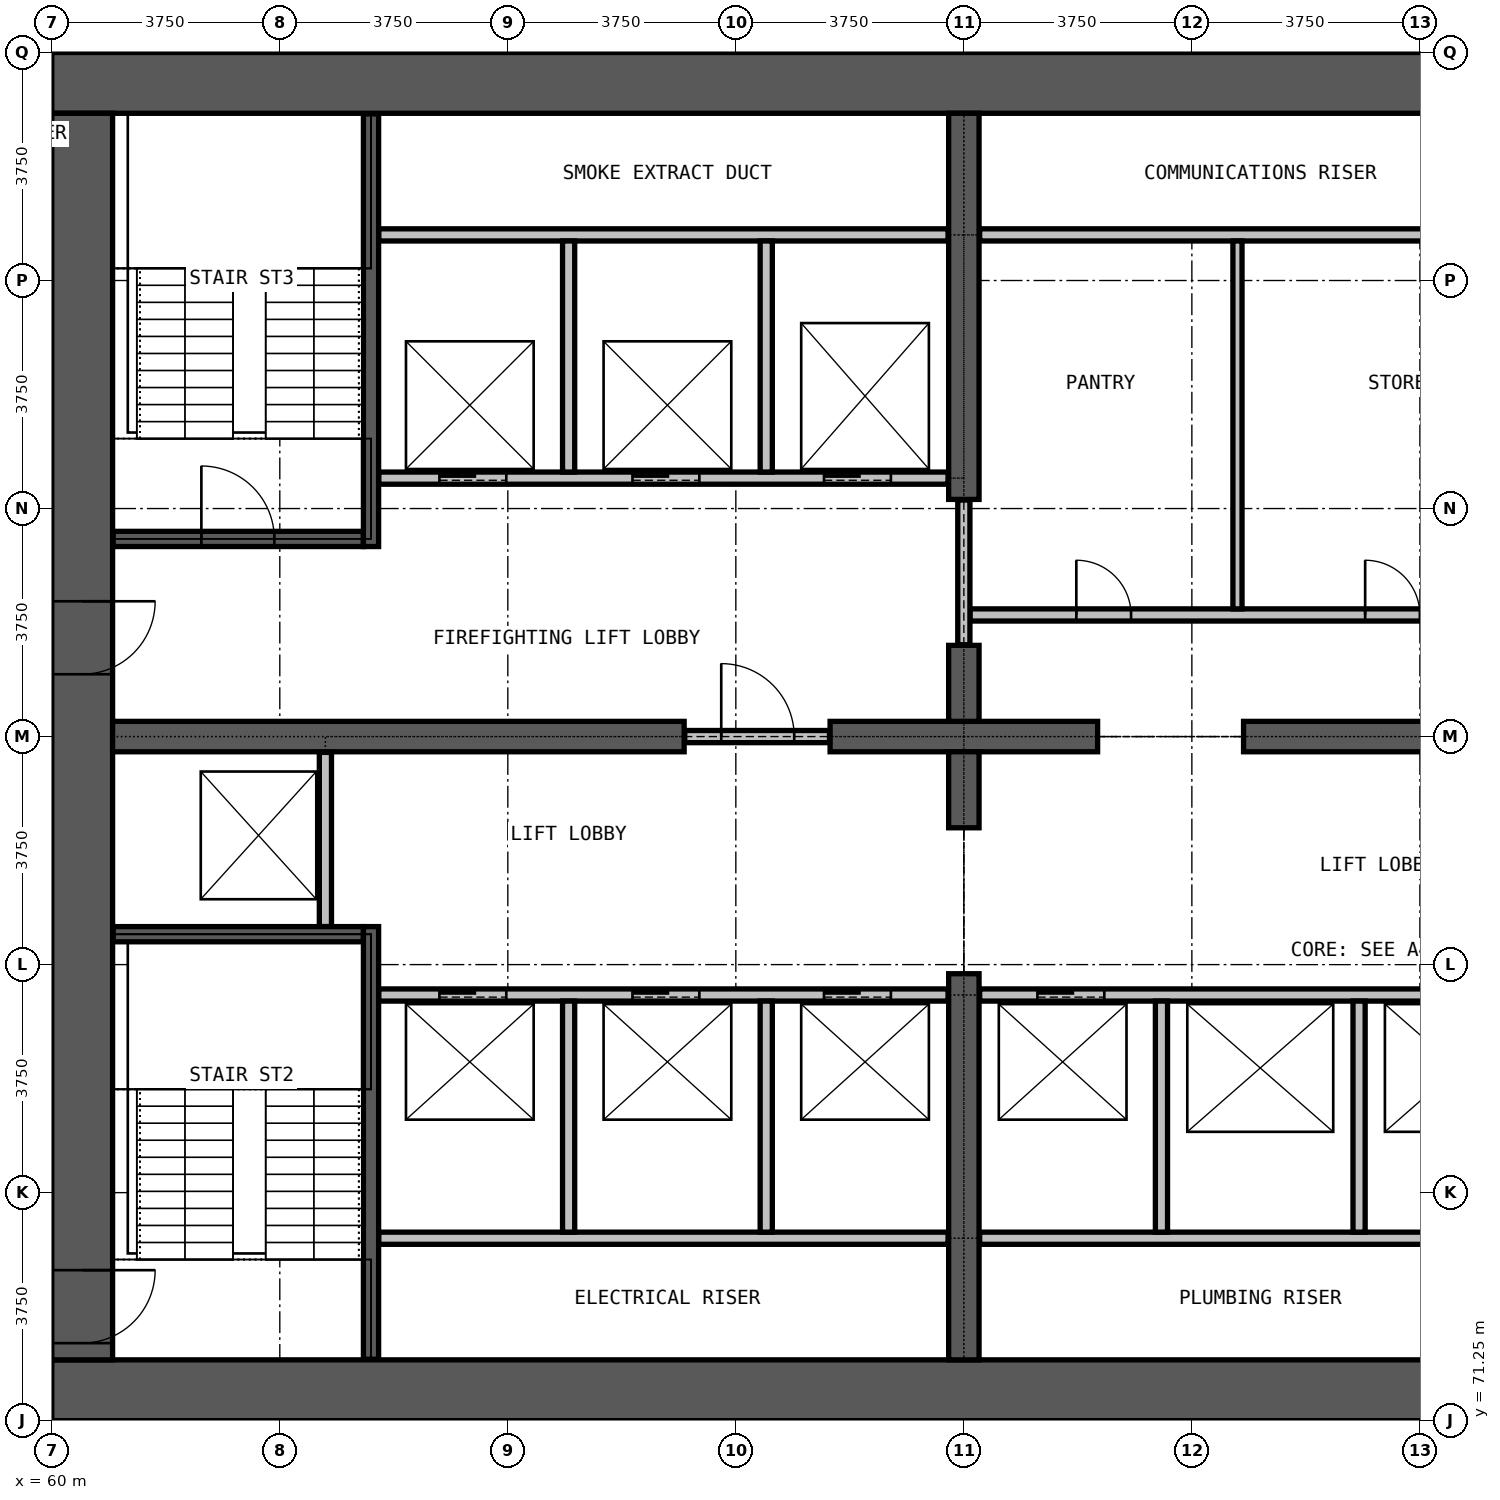
"""IFC4 building model, lengths in metres.
Left out: names, types, materials, properties, quantities, classifications, styles, units other than length and angle.
Written with IfcOpenShell. Run it as: python <this file> out.ifc"""

import sys

from ifc_helpers import new_model, si_unit, direction, frame, frame_2d, origin, place, context, subcontext, project, spatial, rectangle, extrude, element, fill, save


model = new_model("IFC4")
c1 = context("Model", 3, precision=1e-05, world=origin(), true_north=direction((0.0, 1.0)))
c2 = subcontext(c1, "Body", "Model", "MODEL_VIEW")
j1 = project(units=[si_unit("LENGTHUNIT", "METRE"), si_unit("PLANEANGLEUNIT", "RADIAN")], contexts=[c1])
p1 = place(None, origin())
s1 = spatial("IfcSite", under=j1, at=p1, CompositionType="ELEMENT")
p2 = place(p1, origin())
s2 = spatial("IfcBuilding", under=s1, at=p2, CompositionType="ELEMENT")
p3 = place(p2, frame((0.0, 0.0, 16.5)))
s3 = spatial("IfcBuildingStorey", under=s2, at=p3, CompositionType="ELEMENT", Elevation=16.5)
for number, where, z_axis, x_axis in (
    (1, (60.0, 71.75, 0.0), (0.0, 0.0, 1.0), (1.0, 0.0, 0.0)),
    (2, (90.0, 93.25, 0.0), (0.0, 0.0, 1.0), (-1.0, 0.0, 0.0)),
):
    element("IfcWall", number, at=place(p3, frame(where, z_axis=z_axis, x_axis=x_axis)), inside=s3, PredefinedType="SHEAR", context=c2, shape_type="SweptSolid", body=[
        extrude(rectangle(XDim=30.0, YDim=1.0, at=frame_2d((15.0, 0.0))), origin(), (0.0, 0.0, 1.0), 7.5),
    ])
p4 = place(p3, frame((60.5, 92.75, 0.0), z_axis=(0.0, 0.0, 1.0), x_axis=(0.0, -1.0, 0.0)))
e3 = element("IfcWall", 3, at=p4, inside=s3, PredefinedType="SHEAR", context=c2, shape_type="SweptSolid", body=[
    extrude(rectangle(XDim=20.5, YDim=1.0, at=frame_2d((10.25, 0.0))), origin(), (0.0, 0.0, 1.0), 7.5),
])
p5 = place(p4, frame((19.025, 0.0, 0.0)))
e4 = element("IfcOpeningElement", 4, at=p5, cuts=e3, PredefinedType="OPENING", context=c2, shape_type="SweptSolid", body=[
    extrude(rectangle(XDim=1.2, YDim=2.2, at=frame_2d((0.6, 1.1))), frame((0.0, 0.51, 0.0), z_axis=(0.0, -1.0, 0.0), x_axis=(1.0, 0.0, 0.0)), (0.0, 0.0, 1.0), 1.02),
])
p6 = place(p4, frame((8.025, 0.0, 0.0)))
e5 = element("IfcOpeningElement", 5, at=p6, cuts=e3, PredefinedType="OPENING", context=c2, shape_type="SweptSolid", body=[
    extrude(rectangle(XDim=1.2, YDim=2.2, at=frame_2d((0.6, 1.1))), frame((0.0, 0.51, 0.0), z_axis=(0.0, -1.0, 0.0), x_axis=(1.0, 0.0, 0.0)), (0.0, 0.0, 1.0), 1.02),
])
p7 = place(p3, frame((61.0, 82.5, 0.0), z_axis=(0.0, 0.0, 1.0), x_axis=(1.0, 0.0, 0.0)))
e6 = element("IfcWall", 6, at=p7, inside=s3, PredefinedType="SHEAR", context=c2, shape_type="SweptSolid", body=[
    extrude(rectangle(XDim=9.4, YDim=0.5, at=frame_2d((4.7, 0.0))), origin(), (0.0, 0.0, 1.0), 7.5),
])
p8 = place(p3, frame((72.8, 82.5, 0.0), z_axis=(0.0, 0.0, 1.0), x_axis=(1.0, 0.0, 0.0)))
e7 = element("IfcWall", 7, at=p8, inside=s3, PredefinedType="SHEAR", context=c2, shape_type="SweptSolid", body=[
    extrude(rectangle(XDim=4.4, YDim=0.5, at=frame_2d((2.2, 0.0))), origin(), (0.0, 0.0, 1.0), 7.5),
])
p9 = place(p3, frame((79.6, 82.5, 0.0), z_axis=(0.0, 0.0, 1.0), x_axis=(1.0, 0.0, 0.0)))
e8 = element("IfcWall", 8, at=p9, inside=s3, PredefinedType="SHEAR", context=c2, shape_type="SweptSolid", body=[
    extrude(rectangle(XDim=9.4, YDim=0.5, at=frame_2d((4.7, 0.0))), origin(), (0.0, 0.0, 1.0), 7.5),
])
p10 = place(p3, frame((75.0, 72.25, 0.0), z_axis=(0.0, 0.0, 1.0), x_axis=(0.0, 1.0, 0.0)))
e9 = element("IfcWall", 9, at=p10, inside=s3, PredefinedType="SHEAR", context=c2, shape_type="SweptSolid", body=[
    extrude(rectangle(XDim=6.35, YDim=0.5, at=frame_2d((3.175, 0.0))), origin(), (0.0, 0.0, 1.0), 7.5),
])
for number, where, z_axis, x_axis in (
    (10, (75.0, 81.0, 0.0), (0.0, 0.0, 1.0), (0.0, 1.0, 0.0)),
    (11, (75.0, 82.75, 0.0), (0.0, 0.0, 1.0), (0.0, 1.0, 0.0)),
):
    element("IfcWall", number, at=place(p3, frame(where, z_axis=z_axis, x_axis=x_axis)), inside=s3, PredefinedType="SHEAR", context=c2, shape_type="SweptSolid", body=[
        extrude(rectangle(XDim=1.25, YDim=0.5, at=frame_2d((0.625, 0.0))), origin(), (0.0, 0.0, 1.0), 7.5),
    ])
p11 = place(p3, frame((75.0, 86.4, 0.0), z_axis=(0.0, 0.0, 1.0), x_axis=(0.0, 1.0, 0.0)))
e12 = element("IfcWall", 12, at=p11, inside=s3, PredefinedType="SHEAR", context=c2, shape_type="SweptSolid", body=[
    extrude(rectangle(XDim=6.35, YDim=0.5, at=frame_2d((3.175, 0.0))), origin(), (0.0, 0.0, 1.0), 7.5),
])
p12 = place(p3, frame((70.41, 82.5, 0.0), z_axis=(0.0, 0.0, 1.0), x_axis=(1.0, 0.0, 0.0)))
e13 = element("IfcWall", 13, at=p12, inside=s3, PredefinedType="PARTITIONING", context=c2, shape_type="SweptSolid", body=[
    extrude(rectangle(XDim=2.38, YDim=0.2, at=frame_2d((1.19, 0.0))), origin(), (0.0, 0.0, 1.0), 2.4),
])
p13 = place(p12, frame((0.6, 0.0, 0.0)))
e14 = element("IfcOpeningElement", 14, at=p13, cuts=e13, PredefinedType="OPENING", context=c2, shape_type="SweptSolid", body=[
    extrude(rectangle(XDim=1.2, YDim=2.2, at=frame_2d((0.6, 1.1))), frame((0.0, 0.11, 0.0), z_axis=(0.0, -1.0, 0.0), x_axis=(1.0, 0.0, 0.0)), (0.0, 0.0, 1.0), 0.22),
])
p14 = place(p3, frame((75.1, 84.5, 0.0), z_axis=(0.0, 0.0, 1.0), x_axis=(1.0, 0.0, 0.0)))
e15 = element("IfcWall", 15, at=p14, inside=s3, PredefinedType="PARTITIONING", context=c2, shape_type="SweptSolid", body=[
    extrude(rectangle(XDim=9.55, YDim=0.2, at=frame_2d((4.775, 0.0))), origin(), (0.0, 0.0, 1.0), 7.15),
])
p15 = place(p14, frame((1.75, 0.0, 0.0)))
e16 = element("IfcOpeningElement", 16, at=p15, cuts=e15, PredefinedType="OPENING", context=c2, shape_type="SweptSolid", body=[
    extrude(rectangle(XDim=0.9, YDim=2.2, at=frame_2d((0.45, 1.1))), frame((0.0, 0.11, 0.0), z_axis=(0.0, -1.0, 0.0), x_axis=(1.0, 0.0, 0.0)), (0.0, 0.0, 1.0), 0.22),
])
p16 = place(p14, frame((6.5, 0.0, 0.0)))
e17 = element("IfcOpeningElement", 17, at=p16, cuts=e15, PredefinedType="OPENING", context=c2, shape_type="SweptSolid", body=[
    extrude(rectangle(XDim=0.9, YDim=2.2, at=frame_2d((0.45, 1.1))), frame((0.0, 0.11, 0.0), z_axis=(0.0, -1.0, 0.0), x_axis=(1.0, 0.0, 0.0)), (0.0, 0.0, 1.0), 0.22),
])
p17 = place(p3, frame((75.26, 90.75, 0.0), z_axis=(0.0, 0.0, 1.0), x_axis=(1.0, 0.0, 0.0)))
e18 = element("IfcWall", 18, at=p17, inside=s3, PredefinedType="PARTITIONING", context=c2, shape_type="SweptSolid", body=[
    extrude(rectangle(XDim=9.365, YDim=0.2, at=frame_2d((4.683, 0.0))), origin(), (0.0, 0.0, 1.0), 7.15),
])
p18 = place(p3, frame((75.0, 84.01, 0.0), z_axis=(0.0, 0.0, 1.0), x_axis=(0.0, 1.0, 0.0)))
e19 = element("IfcWall", 19, at=p18, inside=s3, PredefinedType="PARTITIONING", context=c2, shape_type="SweptSolid", body=[
    extrude(rectangle(XDim=2.38, YDim=0.2, at=frame_2d((1.19, 0.0))), origin(), (0.0, 0.0, 1.0), 2.4),
])
p19 = place(p3, frame((79.5, 84.6, 0.0), z_axis=(0.0, 0.0, 1.0), x_axis=(0.0, 1.0, 0.0)))
e20 = element("IfcWall", 20, at=p19, inside=s3, PredefinedType="PARTITIONING", context=c2, shape_type="SweptSolid", body=[
    extrude(rectangle(XDim=6.05, YDim=0.15, at=frame_2d((3.025, 0.0))), origin(), (0.0, 0.0, 1.0), 7.15),
])
for number, where, z_axis, x_axis in (
    (21, (65.375, 74.25, 0.0), (0.0, 0.0, 1.0), (1.0, 0.0, 0.0)),
    (22, (75.26, 74.25, 0.0), (0.0, 0.0, 1.0), (1.0, 0.0, 0.0)),
):
    element("IfcWall", number, at=place(p3, frame(where, z_axis=z_axis, x_axis=x_axis)), inside=s3, PredefinedType="PARTITIONING", context=c2, shape_type="SweptSolid", body=[
        extrude(rectangle(XDim=9.365, YDim=0.2, at=frame_2d((4.683, 0.0))), origin(), (0.0, 0.0, 1.0), 7.15),
    ])
p20 = place(p3, frame((65.375, 78.25, 0.0), z_axis=(0.0, 0.0, 1.0), x_axis=(1.0, 0.0, 0.0)))
e23 = element("IfcWall", 23, at=p20, inside=s3, PredefinedType="PARTITIONING", context=c2, shape_type="SweptSolid", body=[
    extrude(rectangle(XDim=9.365, YDim=0.2, at=frame_2d((4.683, 0.0))), origin(), (0.0, 0.0, 1.0), 7.15),
])
p21 = place(p20, frame((1.0, 0.0, 0.0)))
e24 = element("IfcOpeningElement", 24, at=p21, cuts=e23, PredefinedType="OPENING", context=c2, shape_type="SweptSolid", body=[
    extrude(rectangle(XDim=1.1, YDim=2.2, at=frame_2d((0.55, 1.1))), frame((0.0, 0.11, 0.0), z_axis=(0.0, -1.0, 0.0), x_axis=(1.0, 0.0, 0.0)), (0.0, 0.0, 1.0), 0.22),
])
p22 = place(p20, frame((4.175, 0.0, 0.0)))
e25 = element("IfcOpeningElement", 25, at=p22, cuts=e23, PredefinedType="OPENING", context=c2, shape_type="SweptSolid", body=[
    extrude(rectangle(XDim=1.1, YDim=2.2, at=frame_2d((0.55, 1.1))), frame((0.0, 0.11, 0.0), z_axis=(0.0, -1.0, 0.0), x_axis=(1.0, 0.0, 0.0)), (0.0, 0.0, 1.0), 0.22),
])
p23 = place(p20, frame((7.325, 0.0, 0.0)))
e26 = element("IfcOpeningElement", 26, at=p23, cuts=e23, PredefinedType="OPENING", context=c2, shape_type="SweptSolid", body=[
    extrude(rectangle(XDim=1.1, YDim=2.2, at=frame_2d((0.55, 1.1))), frame((0.0, 0.11, 0.0), z_axis=(0.0, -1.0, 0.0), x_axis=(1.0, 0.0, 0.0)), (0.0, 0.0, 1.0), 0.22),
])
p24 = place(p3, frame((75.26, 78.25, 0.0), z_axis=(0.0, 0.0, 1.0), x_axis=(1.0, 0.0, 0.0)))
e27 = element("IfcWall", 27, at=p24, inside=s3, PredefinedType="PARTITIONING", context=c2, shape_type="SweptSolid", body=[
    extrude(rectangle(XDim=9.365, YDim=0.2, at=frame_2d((4.683, 0.0))), origin(), (0.0, 0.0, 1.0), 7.15),
])
p25 = place(p24, frame((0.95, 0.0, 0.0)))
e28 = element("IfcOpeningElement", 28, at=p25, cuts=e27, PredefinedType="OPENING", context=c2, shape_type="SweptSolid", body=[
    extrude(rectangle(XDim=1.1, YDim=2.2, at=frame_2d((0.55, 1.1))), frame((0.0, 0.11, 0.0), z_axis=(0.0, -1.0, 0.0), x_axis=(1.0, 0.0, 0.0)), (0.0, 0.0, 1.0), 0.22),
])
p26 = place(p3, frame((65.375, 86.75, 0.0), z_axis=(0.0, 0.0, 1.0), x_axis=(1.0, 0.0, 0.0)))
e29 = element("IfcWall", 29, at=p26, inside=s3, PredefinedType="PARTITIONING", context=c2, shape_type="SweptSolid", body=[
    extrude(rectangle(XDim=9.365, YDim=0.2, at=frame_2d((4.683, 0.0))), origin(), (0.0, 0.0, 1.0), 7.15),
])
p27 = place(p26, frame((1.0, 0.0, 0.0)))
e30 = element("IfcOpeningElement", 30, at=p27, cuts=e29, PredefinedType="OPENING", context=c2, shape_type="SweptSolid", body=[
    extrude(rectangle(XDim=1.1, YDim=2.2, at=frame_2d((0.55, 1.1))), frame((0.0, 0.11, 0.0), z_axis=(0.0, -1.0, 0.0), x_axis=(1.0, 0.0, 0.0)), (0.0, 0.0, 1.0), 0.22),
])
p28 = place(p26, frame((4.175, 0.0, 0.0)))
e31 = element("IfcOpeningElement", 31, at=p28, cuts=e29, PredefinedType="OPENING", context=c2, shape_type="SweptSolid", body=[
    extrude(rectangle(XDim=1.1, YDim=2.2, at=frame_2d((0.55, 1.1))), frame((0.0, 0.11, 0.0), z_axis=(0.0, -1.0, 0.0), x_axis=(1.0, 0.0, 0.0)), (0.0, 0.0, 1.0), 0.22),
])
p29 = place(p26, frame((7.325, 0.0, 0.0)))
e32 = element("IfcOpeningElement", 32, at=p29, cuts=e29, PredefinedType="OPENING", context=c2, shape_type="SweptSolid", body=[
    extrude(rectangle(XDim=1.1, YDim=2.2, at=frame_2d((0.55, 1.1))), frame((0.0, 0.11, 0.0), z_axis=(0.0, -1.0, 0.0), x_axis=(1.0, 0.0, 0.0)), (0.0, 0.0, 1.0), 0.22),
])
p30 = place(p3, frame((65.375, 90.75, 0.0), z_axis=(0.0, 0.0, 1.0), x_axis=(1.0, 0.0, 0.0)))
e33 = element("IfcWall", 33, at=p30, inside=s3, PredefinedType="PARTITIONING", context=c2, shape_type="SweptSolid", body=[
    extrude(rectangle(XDim=9.365, YDim=0.2, at=frame_2d((4.683, 0.0))), origin(), (0.0, 0.0, 1.0), 7.15),
])
p31 = place(p3, frame((64.5, 79.375, 0.0), z_axis=(0.0, 0.0, 1.0), x_axis=(0.0, 1.0, 0.0)))
e34 = element("IfcWall", 34, at=p31, inside=s3, PredefinedType="PARTITIONING", context=c2, shape_type="SweptSolid", body=[
    extrude(rectangle(XDim=2.865, YDim=0.2, at=frame_2d((1.433, 0.0))), origin(), (0.0, 0.0, 1.0), 7.15),
])
for number, where, z_axis, x_axis in (
    (35, (68.5, 74.35, 0.0), (0.0, 0.0, 1.0), (0.0, 1.0, 0.0)),
    (36, (68.5, 86.85, 0.0), (0.0, 0.0, 1.0), (0.0, 1.0, 0.0)),
    (37, (71.75, 74.35, 0.0), (0.0, 0.0, 1.0), (0.0, 1.0, 0.0)),
    (38, (71.75, 86.85, 0.0), (0.0, 0.0, 1.0), (0.0, 1.0, 0.0)),
    (39, (78.25, 74.35, 0.0), (0.0, 0.0, 1.0), (0.0, 1.0, 0.0)),
    (40, (81.5, 74.35, 0.0), (0.0, 0.0, 1.0), (0.0, 1.0, 0.0)),
):
    element("IfcWall", number, at=place(p3, frame(where, z_axis=z_axis, x_axis=x_axis)), inside=s3, PredefinedType="PARTITIONING", context=c2, shape_type="SweptSolid", body=[
        extrude(rectangle(XDim=3.8, YDim=0.2, at=frame_2d((1.9, 0.0))), origin(), (0.0, 0.0, 1.0), 7.15),
    ])
p32 = place(p3, frame((61.01, 79.25, 0.0), z_axis=(0.0, 0.0, 1.0), x_axis=(1.0, 0.0, 0.0)))
e41 = element("IfcWall", 41, at=p32, inside=s3, PredefinedType="PARTITIONING", context=c2, shape_type="SweptSolid", body=[
    extrude(rectangle(XDim=4.115, YDim=0.25, at=frame_2d((2.058, 0.0))), origin(), (0.0, 0.0, 1.0), 7.15),
])
p33 = place(p3, frame((61.01, 85.75, 0.0), z_axis=(0.0, 0.0, 1.0), x_axis=(1.0, 0.0, 0.0)))
e42 = element("IfcWall", 42, at=p33, inside=s3, PredefinedType="PARTITIONING", context=c2, shape_type="SweptSolid", body=[
    extrude(rectangle(XDim=4.115, YDim=0.25, at=frame_2d((2.058, 0.0))), origin(), (0.0, 0.0, 1.0), 7.15),
])
p34 = place(p33, frame((1.45, 0.0, 0.0)))
e43 = element("IfcOpeningElement", 43, at=p34, cuts=e42, PredefinedType="OPENING", context=c2, shape_type="SweptSolid", body=[
    extrude(rectangle(XDim=1.2, YDim=2.2, at=frame_2d((0.6, 1.1))), frame((0.0, 0.135, 0.0), z_axis=(0.0, -1.0, 0.0), x_axis=(1.0, 0.0, 0.0)), (0.0, 0.0, 1.0), 0.27),
])
for number, where, z_axis, x_axis in (
    (44, (65.25, 72.26, 0.0), (0.0, 0.0, 1.0), (0.0, 1.0, 0.0)),
    (45, (65.25, 85.625, 0.0), (0.0, 0.0, 1.0), (0.0, 1.0, 0.0)),
):
    element("IfcWall", number, at=place(p3, frame(where, z_axis=z_axis, x_axis=x_axis)), inside=s3, PredefinedType="PARTITIONING", context=c2, shape_type="SweptSolid", body=[
        extrude(rectangle(XDim=7.115, YDim=0.25, at=frame_2d((3.558, 0.0))), origin(), (0.0, 0.0, 1.0), 7.15),
    ])
p35 = place(p21, origin())
e46 = element("IfcDoor", 46, at=p35, inside=s3, OperationType="DOUBLE_DOOR_SLIDING", PredefinedType="DOOR", context=c2, shape_type="SweptSolid", body=[
    extrude(rectangle(XDim=1.1, YDim=2.2, at=frame_2d((0.55, 1.1))), frame((0.0, 0.025, 0.0), z_axis=(0.0, -1.0, 0.0), x_axis=(1.0, 0.0, 0.0)), (0.0, 0.0, 1.0), 0.05),
])
fill(e24, e46)
p36 = place(p22, origin())
e47 = element("IfcDoor", 47, at=p36, inside=s3, OperationType="DOUBLE_DOOR_SLIDING", PredefinedType="DOOR", context=c2, shape_type="SweptSolid", body=[
    extrude(rectangle(XDim=1.1, YDim=2.2, at=frame_2d((0.55, 1.1))), frame((0.0, 0.025, 0.0), z_axis=(0.0, -1.0, 0.0), x_axis=(1.0, 0.0, 0.0)), (0.0, 0.0, 1.0), 0.05),
])
fill(e25, e47)
p37 = place(p23, origin())
e48 = element("IfcDoor", 48, at=p37, inside=s3, OperationType="DOUBLE_DOOR_SLIDING", PredefinedType="DOOR", context=c2, shape_type="SweptSolid", body=[
    extrude(rectangle(XDim=1.1, YDim=2.2, at=frame_2d((0.55, 1.1))), frame((0.0, 0.025, 0.0), z_axis=(0.0, -1.0, 0.0), x_axis=(1.0, 0.0, 0.0)), (0.0, 0.0, 1.0), 0.05),
])
fill(e26, e48)
p38 = place(p25, origin())
e49 = element("IfcDoor", 49, at=p38, inside=s3, OperationType="DOUBLE_DOOR_SLIDING", PredefinedType="DOOR", context=c2, shape_type="SweptSolid", body=[
    extrude(rectangle(XDim=1.1, YDim=2.2, at=frame_2d((0.55, 1.1))), frame((0.0, 0.025, 0.0), z_axis=(0.0, -1.0, 0.0), x_axis=(1.0, 0.0, 0.0)), (0.0, 0.0, 1.0), 0.05),
])
fill(e28, e49)
p39 = place(p27, origin())
e50 = element("IfcDoor", 50, at=p39, inside=s3, OperationType="DOUBLE_DOOR_SLIDING", PredefinedType="DOOR", context=c2, shape_type="SweptSolid", body=[
    extrude(rectangle(XDim=1.1, YDim=2.2, at=frame_2d((0.55, 1.1))), frame((0.0, 0.025, 0.0), z_axis=(0.0, -1.0, 0.0), x_axis=(1.0, 0.0, 0.0)), (0.0, 0.0, 1.0), 0.05),
])
fill(e30, e50)
p40 = place(p28, origin())
e51 = element("IfcDoor", 51, at=p40, inside=s3, OperationType="DOUBLE_DOOR_SLIDING", PredefinedType="DOOR", context=c2, shape_type="SweptSolid", body=[
    extrude(rectangle(XDim=1.1, YDim=2.2, at=frame_2d((0.55, 1.1))), frame((0.0, 0.025, 0.0), z_axis=(0.0, -1.0, 0.0), x_axis=(1.0, 0.0, 0.0)), (0.0, 0.0, 1.0), 0.05),
])
fill(e31, e51)
p41 = place(p29, origin())
e52 = element("IfcDoor", 52, at=p41, inside=s3, OperationType="DOUBLE_DOOR_SLIDING", PredefinedType="DOOR", context=c2, shape_type="SweptSolid", body=[
    extrude(rectangle(XDim=1.1, YDim=2.2, at=frame_2d((0.55, 1.1))), frame((0.0, 0.025, 0.0), z_axis=(0.0, -1.0, 0.0), x_axis=(1.0, 0.0, 0.0)), (0.0, 0.0, 1.0), 0.05),
])
fill(e32, e52)
p42 = place(p13, origin())
e53 = element("IfcDoor", 53, at=p42, inside=s3, OperationType="SINGLE_SWING_LEFT", PredefinedType="DOOR", context=c2, shape_type="SweptSolid", body=[
    extrude(rectangle(XDim=1.2, YDim=2.2, at=frame_2d((0.6, 1.1))), frame((0.0, 0.025, 0.0), z_axis=(0.0, -1.0, 0.0), x_axis=(1.0, 0.0, 0.0)), (0.0, 0.0, 1.0), 0.05),
])
fill(e14, e53)
p43 = place(p34, origin())
e54 = element("IfcDoor", 54, at=p43, inside=s3, OperationType="SINGLE_SWING_LEFT", PredefinedType="DOOR", context=c2, shape_type="SweptSolid", body=[
    extrude(rectangle(XDim=1.2, YDim=2.2, at=frame_2d((0.6, 1.1))), frame((0.0, 0.025, 0.0), z_axis=(0.0, -1.0, 0.0), x_axis=(1.0, 0.0, 0.0)), (0.0, 0.0, 1.0), 0.05),
])
fill(e43, e54)
p44 = place(p5, origin())
e55 = element("IfcDoor", 55, at=p44, inside=s3, OperationType="SINGLE_SWING_LEFT", PredefinedType="DOOR", context=c2, shape_type="SweptSolid", body=[
    extrude(rectangle(XDim=1.2, YDim=2.2, at=frame_2d((0.6, 1.1))), frame((0.0, 0.025, 0.0), z_axis=(0.0, -1.0, 0.0), x_axis=(1.0, 0.0, 0.0)), (0.0, 0.0, 1.0), 0.05),
])
fill(e4, e55)
p45 = place(p6, origin())
e56 = element("IfcDoor", 56, at=p45, inside=s3, OperationType="SINGLE_SWING_RIGHT", PredefinedType="DOOR", context=c2, shape_type="SweptSolid", body=[
    extrude(rectangle(XDim=1.2, YDim=2.2, at=frame_2d((0.6, 1.1))), frame((0.0, 0.025, 0.0), z_axis=(0.0, -1.0, 0.0), x_axis=(1.0, 0.0, 0.0)), (0.0, 0.0, 1.0), 0.05),
])
fill(e5, e56)
p46 = place(p15, origin())
e57 = element("IfcDoor", 57, at=p46, inside=s3, OperationType="SINGLE_SWING_RIGHT", PredefinedType="DOOR", context=c2, shape_type="SweptSolid", body=[
    extrude(rectangle(XDim=0.9, YDim=2.2, at=frame_2d((0.45, 1.1))), frame((0.0, 0.025, 0.0), z_axis=(0.0, -1.0, 0.0), x_axis=(1.0, 0.0, 0.0)), (0.0, 0.0, 1.0), 0.05),
])
fill(e16, e57)
p47 = place(p16, origin())
e58 = element("IfcDoor", 58, at=p47, inside=s3, OperationType="SINGLE_SWING_LEFT", PredefinedType="DOOR", context=c2, shape_type="SweptSolid", body=[
    extrude(rectangle(XDim=0.9, YDim=2.2, at=frame_2d((0.45, 1.1))), frame((0.0, 0.025, 0.0), z_axis=(0.0, -1.0, 0.0), x_axis=(1.0, 0.0, 0.0)), (0.0, 0.0, 1.0), 0.05),
])
fill(e17, e58)
save(model, sys.argv[1])
